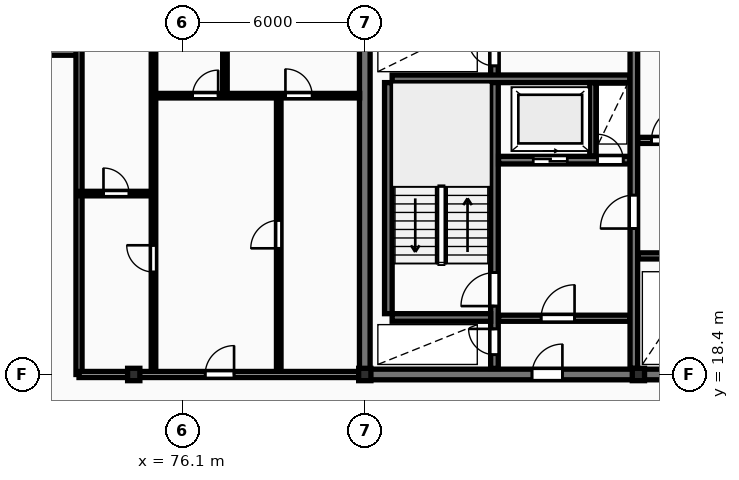
"""IFC4 building model, lengths in metres.
Left out: names, types, materials, properties, quantities, classifications, styles, units other than length and angle.
Written with IfcOpenShell. Run it as: python <this file> out.ifc"""

import sys

from ifc_helpers import new_model, si_unit, direction, frame, frame_2d, origin, origin_2d, place, context, subcontext, project, spatial, rectangle, i_section, extrude, element, fill, save


model = new_model("IFC4")
c1 = context("Model", 3, precision=1e-05, world=origin(), true_north=direction((0.0, 1.0)))
c2 = subcontext(c1, "Body", "Model", "MODEL_VIEW")
j1 = project(units=[si_unit("LENGTHUNIT", "METRE"), si_unit("PLANEANGLEUNIT", "RADIAN")], contexts=[c1])
p1 = place(None, origin())
s1 = spatial("IfcSite", under=j1, at=p1, CompositionType="ELEMENT")
p2 = place(p1, origin())
s2 = spatial("IfcBuilding", under=s1, at=p2, CompositionType="ELEMENT")
p3 = place(p2, frame((0.0, 0.0, 142.9)))
s3 = spatial("IfcBuildingStorey", under=s2, at=p3, CompositionType="ELEMENT", Elevation=142.9)
for number, where, z_axis, x_axis in (
    (1, (74.5, 18.4, 0.0), (0.0, 0.0, 1.0), (1.0, 0.0, 0.0)),
    (2, (82.1, 18.4, 0.0), (0.0, 0.0, 1.0), (1.0, 0.0, 0.0)),
    (3, (91.1, 18.4, 0.0), (0.0, 0.0, 1.0), (1.0, 0.0, 0.0)),
):
    element("IfcColumn", number, at=place(p3, frame(where, z_axis=z_axis, x_axis=x_axis)), inside=s3, PredefinedType="COLUMN", context=c2, shape_type="SweptSolid", body=[
        extrude(i_section(OverallWidth=0.403, OverallDepth=0.406, WebThickness=0.027, FlangeThickness=0.043, FilletRadius=0.015, at=origin_2d()), origin(), (0.0, 0.0, 1.0), 3.6),
    ])
p4 = place(p3, frame((72.7, 29.05, 0.0), z_axis=(0.0, 0.0, 1.0), x_axis=(-1.0, 0.0, 0.0)))
e4 = element("IfcWall", 4, at=p4, inside=s3, PredefinedType="STANDARD", context=c2, shape_type="SweptSolid", body=[
    extrude(rectangle(XDim=3.6, YDim=0.3, at=frame_2d((1.8, 0.0))), origin(), (0.0, 0.0, 1.0), 3.31),
])
p5 = place(p3, frame((82.1, 18.575, 0.0), z_axis=(0.0, 0.0, 1.0), x_axis=(0.0, 1.0, 0.0)))
e5 = element("IfcWall", 5, at=p5, inside=s3, PredefinedType="SHEAR", context=c2, shape_type="SweptSolid", body=[
    extrude(rectangle(XDim=11.65, YDim=0.35, at=frame_2d((5.825, 0.0))), origin(), (0.0, 0.0, 1.0), 3.6),
])
p6 = place(p3, frame((81.925, 18.4, 0.0), z_axis=(0.0, 0.0, 1.0), x_axis=(1.0, 0.0, 0.0)))
e6 = element("IfcWall", 6, at=p6, inside=s3, PredefinedType="SHEAR", context=c2, shape_type="SweptSolid", body=[
    extrude(rectangle(XDim=36.265, YDim=0.35, at=frame_2d((18.132, 0.0))), origin(), (0.0, 0.0, 1.0), 3.6),
])
p7 = place(p6, frame((5.675, 0.0, 0.0)))
e7 = element("IfcOpeningElement", 7, at=p7, cuts=e6, PredefinedType="OPENING", context=c2, shape_type="SweptSolid", body=[
    extrude(rectangle(XDim=1.0, YDim=2.15, at=frame_2d((0.5, 1.075))), frame((0.0, 0.185, 0.0), z_axis=(0.0, -1.0, 0.0), x_axis=(1.0, 0.0, 0.0)), (0.0, 0.0, 1.0), 0.37),
])
p8 = place(p6, frame((21.925, 0.0, 0.0)))
e8 = element("IfcOpeningElement", 8, at=p8, cuts=e6, PredefinedType="OPENING", context=c2, shape_type="SweptSolid", body=[
    extrude(rectangle(XDim=1.5, YDim=2.2, at=frame_2d((0.75, 1.1))), frame((0.0, 0.185, 0.0), z_axis=(0.0, -1.0, 0.0), x_axis=(1.0, 0.0, 0.0)), (0.0, 0.0, 1.0), 0.37),
])
p9 = place(p6, frame((29.875, 0.0, 0.0)))
e9 = element("IfcOpeningElement", 9, at=p9, cuts=e6, PredefinedType="OPENING", context=c2, shape_type="SweptSolid", body=[
    extrude(rectangle(XDim=1.0, YDim=2.15, at=frame_2d((0.5, 1.075))), frame((0.0, 0.185, 0.0), z_axis=(0.0, -1.0, 0.0), x_axis=(1.0, 0.0, 0.0)), (0.0, 0.0, 1.0), 0.37),
])
p10 = place(p3, frame((82.875, 20.4, 0.0), z_axis=(0.0, 0.0, 1.0), x_axis=(0.0, 1.0, 0.0)))
e10 = element("IfcWall", 10, at=p10, inside=s3, PredefinedType="SHEAR", context=c2, shape_type="SweptSolid", body=[
    extrude(rectangle(XDim=7.6, YDim=0.25, at=frame_2d((3.8, 0.0))), origin(), (0.0, 0.0, 1.0), 3.6),
])
p11 = place(p3, frame((86.365, 18.6, 0.0), z_axis=(0.0, 0.0, 1.0), x_axis=(0.0, 1.0, 0.0)))
e11 = element("IfcWall", 11, at=p11, inside=s3, PredefinedType="SHEAR", context=c2, shape_type="SweptSolid", body=[
    extrude(rectangle(XDim=11.6, YDim=0.25, at=frame_2d((5.8, 0.0))), origin(), (0.0, 0.0, 1.0), 3.6),
])
p12 = place(p11, frame((0.45, 0.0, 0.0)))
e12 = element("IfcOpeningElement", 12, at=p12, cuts=e11, PredefinedType="OPENING", context=c2, shape_type="SweptSolid", body=[
    extrude(rectangle(XDim=0.85, YDim=2.05, at=frame_2d((0.425, 1.025))), frame((0.0, 0.135, 0.0), z_axis=(0.0, -1.0, 0.0), x_axis=(1.0, 0.0, 0.0)), (0.0, 0.0, 1.0), 0.27),
])
p13 = place(p11, frame((2.05, 0.0, 0.0)))
e13 = element("IfcOpeningElement", 13, at=p13, cuts=e11, PredefinedType="OPENING", context=c2, shape_type="SweptSolid", body=[
    extrude(rectangle(XDim=1.1, YDim=2.1, at=frame_2d((0.55, 1.05))), frame((0.0, 0.135, 0.0), z_axis=(0.0, -1.0, 0.0), x_axis=(1.0, 0.0, 0.0)), (0.0, 0.0, 1.0), 0.27),
])
p14 = place(p11, frame((9.95, 0.0, 0.0)))
e14 = element("IfcOpeningElement", 14, at=p14, cuts=e11, PredefinedType="OPENING", context=c2, shape_type="SweptSolid", body=[
    extrude(rectangle(XDim=0.85, YDim=2.05, at=frame_2d((0.425, 1.025))), frame((0.0, 0.135, 0.0), z_axis=(0.0, -1.0, 0.0), x_axis=(1.0, 0.0, 0.0)), (0.0, 0.0, 1.0), 0.27),
])
p15 = place(p3, frame((83.0, 20.275, 0.0), z_axis=(0.0, 0.0, 1.0), x_axis=(1.0, 0.0, 0.0)))
e15 = element("IfcWall", 15, at=p15, inside=s3, PredefinedType="SHEAR", context=c2, shape_type="SweptSolid", body=[
    extrude(rectangle(XDim=3.24, YDim=0.25, at=frame_2d((1.62, 0.0))), origin(), (0.0, 0.0, 1.0), 3.6),
])
p16 = place(p3, frame((83.0, 28.125, 0.0), z_axis=(0.0, 0.0, 1.0), x_axis=(1.0, 0.0, 0.0)))
e16 = element("IfcWall", 16, at=p16, inside=s3, PredefinedType="SHEAR", context=c2, shape_type="SweptSolid", body=[
    extrude(rectangle(XDim=7.82, YDim=0.25, at=frame_2d((3.91, 0.0))), origin(), (0.0, 0.0, 1.0), 3.6),
])
p17 = place(p3, frame((86.5, 25.45, 0.0), z_axis=(0.0, 0.0, 1.0), x_axis=(1.0, 0.0, 0.0)))
e17 = element("IfcWall", 17, at=p17, inside=s3, PredefinedType="SHEAR", context=c2, shape_type="SweptSolid", body=[
    extrude(rectangle(XDim=4.32, YDim=0.25, at=frame_2d((2.16, 0.0))), origin(), (0.0, 0.0, 1.0), 3.6),
])
p18 = place(p17, frame((1.14, 0.0, 0.0)))
e18 = element("IfcOpeningElement", 18, at=p18, cuts=e17, PredefinedType="OPENING", context=c2, shape_type="SweptSolid", body=[
    extrude(rectangle(XDim=1.12, YDim=2.12, at=frame_2d((0.56, 1.06))), frame((0.0, 0.135, 0.0), z_axis=(0.0, -1.0, 0.0), x_axis=(1.0, 0.0, 0.0)), (0.0, 0.0, 1.0), 0.27),
])
p19 = place(p17, frame((3.25, 0.0, 0.0)))
e19 = element("IfcOpeningElement", 19, at=p19, cuts=e17, PredefinedType="OPENING", context=c2, shape_type="SweptSolid", body=[
    extrude(rectangle(XDim=0.85, YDim=2.05, at=frame_2d((0.425, 1.025))), frame((0.0, 0.135, 0.0), z_axis=(0.0, -1.0, 0.0), x_axis=(1.0, 0.0, 0.0)), (0.0, 0.0, 1.0), 0.27),
])
p20 = place(p3, frame((89.6, 25.58, 0.0), z_axis=(0.0, 0.0, 1.0), x_axis=(0.0, 1.0, 0.0)))
e20 = element("IfcWall", 20, at=p20, inside=s3, PredefinedType="PARTITIONING", context=c2, shape_type="SweptSolid", body=[
    extrude(rectangle(XDim=2.42, YDim=0.2, at=frame_2d((1.21, 0.0))), origin(), (0.0, 0.0, 1.0), 3.31),
])
p21 = place(p3, frame((86.5, 20.25, 0.0), z_axis=(0.0, 0.0, 1.0), x_axis=(1.0, 0.0, 0.0)))
e21 = element("IfcWall", 21, at=p21, inside=s3, PredefinedType="PARTITIONING", context=c2, shape_type="SweptSolid", body=[
    extrude(rectangle(XDim=4.32, YDim=0.2, at=frame_2d((2.16, 0.0))), origin(), (0.0, 0.0, 1.0), 3.31),
])
p22 = place(p21, frame((1.4, 0.0, 0.0)))
e22 = element("IfcOpeningElement", 22, at=p22, cuts=e21, PredefinedType="OPENING", context=c2, shape_type="SweptSolid", body=[
    extrude(rectangle(XDim=1.1, YDim=2.1, at=frame_2d((0.55, 1.05))), frame((0.0, 0.11, 0.0), z_axis=(0.0, -1.0, 0.0), x_axis=(1.0, 0.0, 0.0)), (0.0, 0.0, 1.0), 0.22),
])
p23 = place(p3, frame((90.95, 18.6, 0.0), z_axis=(0.0, 0.0, 1.0), x_axis=(0.0, 1.0, 0.0)))
e23 = element("IfcWall", 23, at=p23, inside=s3, PredefinedType="SHEAR", context=c2, shape_type="SweptSolid", body=[
    extrude(rectangle(XDim=11.6, YDim=0.25, at=frame_2d((5.8, 0.0))), origin(), (0.0, 0.0, 1.0), 3.6),
])
p24 = place(p23, frame((4.6, 0.0, 0.0)))
e24 = element("IfcOpeningElement", 24, at=p24, cuts=e23, PredefinedType="OPENING", context=c2, shape_type="SweptSolid", body=[
    extrude(rectangle(XDim=1.1, YDim=2.1, at=frame_2d((0.55, 1.05))), frame((0.0, 0.135, 0.0), z_axis=(0.0, -1.0, 0.0), x_axis=(1.0, 0.0, 0.0)), (0.0, 0.0, 1.0), 0.27),
])
p25 = place(p3, frame((91.08, 26.1, 0.0), z_axis=(0.0, 0.0, 1.0), x_axis=(1.0, 0.0, 0.0)))
e25 = element("IfcWall", 25, at=p25, inside=s3, PredefinedType="PARTITIONING", context=c2, shape_type="SweptSolid", body=[
    extrude(rectangle(XDim=8.34, YDim=0.2, at=frame_2d((4.17, 0.0))), origin(), (0.0, 0.0, 1.0), 3.31),
])
p26 = place(p25, frame((0.45, 0.0, 0.0)))
e26 = element("IfcOpeningElement", 26, at=p26, cuts=e25, PredefinedType="OPENING", context=c2, shape_type="SweptSolid", body=[
    extrude(rectangle(XDim=1.1, YDim=2.1, at=frame_2d((0.55, 1.05))), frame((0.0, 0.11, 0.0), z_axis=(0.0, -1.0, 0.0), x_axis=(1.0, 0.0, 0.0)), (0.0, 0.0, 1.0), 0.22),
])
p27 = place(p25, frame((4.6, 0.0, 0.0)))
e27 = element("IfcOpeningElement", 27, at=p27, cuts=e25, PredefinedType="OPENING", context=c2, shape_type="SweptSolid", body=[
    extrude(rectangle(XDim=0.92, YDim=2.08, at=frame_2d((0.46, 1.04))), frame((0.0, 0.11, 0.0), z_axis=(0.0, -1.0, 0.0), x_axis=(1.0, 0.0, 0.0)), (0.0, 0.0, 1.0), 0.22),
])
p28 = place(p3, frame((91.08, 22.3, 0.0), z_axis=(0.0, 0.0, 1.0), x_axis=(1.0, 0.0, 0.0)))
e28 = element("IfcWall", 28, at=p28, inside=s3, PredefinedType="PARTITIONING", context=c2, shape_type="SweptSolid", body=[
    extrude(rectangle(XDim=19.14, YDim=0.2, at=frame_2d((9.57, 0.0))), origin(), (0.0, 0.0, 1.0), 3.31),
])
p29 = place(p28, frame((1.15, 0.0, 0.0)))
e29 = element("IfcOpeningElement", 29, at=p29, cuts=e28, PredefinedType="OPENING", context=c2, shape_type="SweptSolid", body=[
    extrude(rectangle(XDim=0.85, YDim=2.05, at=frame_2d((0.425, 1.025))), frame((0.0, 0.11, 0.0), z_axis=(0.0, -1.0, 0.0), x_axis=(1.0, 0.0, 0.0)), (0.0, 0.0, 1.0), 0.22),
])
p30 = place(p28, frame((3.2, 0.0, 0.0)))
e30 = element("IfcOpeningElement", 30, at=p30, cuts=e28, PredefinedType="OPENING", context=c2, shape_type="SweptSolid", body=[
    extrude(rectangle(XDim=0.85, YDim=2.05, at=frame_2d((0.425, 1.025))), frame((0.0, 0.11, 0.0), z_axis=(0.0, -1.0, 0.0), x_axis=(1.0, 0.0, 0.0)), (0.0, 0.0, 1.0), 0.22),
])
p31 = place(p28, frame((12.72, 0.0, 0.0)))
e31 = element("IfcOpeningElement", 31, at=p31, cuts=e28, PredefinedType="OPENING", context=c2, shape_type="SweptSolid", body=[
    extrude(rectangle(XDim=1.5, YDim=2.2, at=frame_2d((0.75, 1.1))), frame((0.0, 0.11, 0.0), z_axis=(0.0, -1.0, 0.0), x_axis=(1.0, 0.0, 0.0)), (0.0, 0.0, 1.0), 0.22),
])
p32 = place(p28, frame((6.42, 0.0, 0.0)))
e32 = element("IfcOpeningElement", 32, at=p32, cuts=e28, PredefinedType="OPENING", context=c2, shape_type="SweptSolid", body=[
    extrude(rectangle(XDim=0.92, YDim=2.08, at=frame_2d((0.46, 1.04))), frame((0.0, 0.11, 0.0), z_axis=(0.0, -1.0, 0.0), x_axis=(1.0, 0.0, 0.0)), (0.0, 0.0, 1.0), 0.22),
])
p33 = place(p28, frame((15.87, 0.0, 0.0)))
e33 = element("IfcOpeningElement", 33, at=p33, cuts=e28, PredefinedType="OPENING", context=c2, shape_type="SweptSolid", body=[
    extrude(rectangle(XDim=0.92, YDim=2.08, at=frame_2d((0.46, 1.04))), frame((0.0, 0.11, 0.0), z_axis=(0.0, -1.0, 0.0), x_axis=(1.0, 0.0, 0.0)), (0.0, 0.0, 1.0), 0.22),
])
p34 = place(p3, frame((72.7, 18.4, 0.0), z_axis=(0.0, 0.0, 1.0), x_axis=(0.0, 1.0, 0.0)))
e34 = element("IfcWall", 34, at=p34, inside=s3, PredefinedType="PARTITIONING", context=c2, shape_type="SweptSolid", body=[
    extrude(rectangle(XDim=14.1, YDim=0.2, at=frame_2d((7.05, 0.0))), origin(), (0.0, 0.0, 1.0), 3.31),
])
p35 = place(p3, frame((72.7, 24.35, 0.0), z_axis=(0.0, 0.0, 1.0), x_axis=(1.0, 0.0, 0.0)))
e35 = element("IfcWall", 35, at=p35, inside=s3, PredefinedType="PARTITIONING", context=c2, shape_type="SweptSolid", body=[
    extrude(rectangle(XDim=2.45, YDim=0.15, at=frame_2d((1.225, 0.0))), origin(), (0.0, 0.0, 1.0), 3.31),
])
p36 = place(p35, frame((0.805, 0.0, 0.0)))
e36 = element("IfcOpeningElement", 36, at=p36, cuts=e35, PredefinedType="OPENING", context=c2, shape_type="SweptSolid", body=[
    extrude(rectangle(XDim=0.84, YDim=2.04, at=frame_2d((0.42, 1.02))), frame((0.0, 0.085, 0.0), z_axis=(0.0, -1.0, 0.0), x_axis=(1.0, 0.0, 0.0)), (0.0, 0.0, 1.0), 0.17),
])
p37 = place(p3, frame((75.15, 18.45, 0.0), z_axis=(0.0, 0.0, 1.0), x_axis=(0.0, 1.0, 0.0)))
e37 = element("IfcWall", 37, at=p37, inside=s3, PredefinedType="PARTITIONING", context=c2, shape_type="SweptSolid", body=[
    extrude(rectangle(XDim=14.05, YDim=0.15, at=frame_2d((7.025, 0.0))), origin(), (0.0, 0.0, 1.0), 3.31),
])
p38 = place(p37, frame((3.32, 0.0, 0.0)))
e38 = element("IfcOpeningElement", 38, at=p38, cuts=e37, PredefinedType="OPENING", context=c2, shape_type="SweptSolid", body=[
    extrude(rectangle(XDim=0.88, YDim=2.06, at=frame_2d((0.44, 1.03))), frame((0.0, 0.085, 0.0), z_axis=(0.0, -1.0, 0.0), x_axis=(1.0, 0.0, 0.0)), (0.0, 0.0, 1.0), 0.17),
])
p39 = place(p3, frame((79.27, 18.45, 0.0), z_axis=(0.0, 0.0, 1.0), x_axis=(0.0, 1.0, 0.0)))
e39 = element("IfcWall", 39, at=p39, inside=s3, PredefinedType="PARTITIONING", context=c2, shape_type="SweptSolid", body=[
    extrude(rectangle(XDim=9.12, YDim=0.15, at=frame_2d((4.56, 0.0))), origin(), (0.0, 0.0, 1.0), 3.31),
])
p40 = place(p39, frame((4.1, 0.0, 0.0)))
e40 = element("IfcOpeningElement", 40, at=p40, cuts=e39, PredefinedType="OPENING", context=c2, shape_type="SweptSolid", body=[
    extrude(rectangle(XDim=0.92, YDim=2.08, at=frame_2d((0.46, 1.04))), frame((0.0, 0.085, 0.0), z_axis=(0.0, -1.0, 0.0), x_axis=(1.0, 0.0, 0.0)), (0.0, 0.0, 1.0), 0.17),
])
p41 = place(p3, frame((77.5, 27.57, 0.0), z_axis=(0.0, 0.0, 1.0), x_axis=(0.0, 1.0, 0.0)))
e41 = element("IfcWall", 41, at=p41, inside=s3, PredefinedType="PARTITIONING", context=c2, shape_type="SweptSolid", body=[
    extrude(rectangle(XDim=4.93, YDim=0.15, at=frame_2d((2.465, 0.0))), origin(), (0.0, 0.0, 1.0), 3.31),
])
p42 = place(p3, frame((75.17, 27.57, 0.0), z_axis=(0.0, 0.0, 1.0), x_axis=(1.0, 0.0, 0.0)))
e42 = element("IfcWall", 42, at=p42, inside=s3, PredefinedType="PARTITIONING", context=c2, shape_type="SweptSolid", body=[
    extrude(rectangle(XDim=6.76, YDim=0.15, at=frame_2d((3.38, 0.0))), origin(), (0.0, 0.0, 1.0), 3.31),
])
p43 = place(p42, frame((1.266, 0.0, 0.0)))
e43 = element("IfcOpeningElement", 43, at=p43, cuts=e42, PredefinedType="OPENING", context=c2, shape_type="SweptSolid", body=[
    extrude(rectangle(XDim=0.84, YDim=2.04, at=frame_2d((0.42, 1.02))), frame((0.0, 0.085, 0.0), z_axis=(0.0, -1.0, 0.0), x_axis=(1.0, 0.0, 0.0)), (0.0, 0.0, 1.0), 0.17),
])
p44 = place(p42, frame((4.32, 0.0, 0.0)))
e44 = element("IfcOpeningElement", 44, at=p44, cuts=e42, PredefinedType="OPENING", context=c2, shape_type="SweptSolid", body=[
    extrude(rectangle(XDim=0.88, YDim=2.06, at=frame_2d((0.44, 1.03))), frame((0.0, 0.085, 0.0), z_axis=(0.0, -1.0, 0.0), x_axis=(1.0, 0.0, 0.0)), (0.0, 0.0, 1.0), 0.17),
])
p45 = place(p3, frame((72.7, 18.4, 0.0), z_axis=(0.0, 0.0, 1.0), x_axis=(1.0, 0.0, 0.0)))
e45 = element("IfcWall", 45, at=p45, inside=s3, PredefinedType="PARTITIONING", context=c2, shape_type="SweptSolid", body=[
    extrude(rectangle(XDim=9.25, YDim=0.2, at=frame_2d((4.625, 0.0))), origin(), (0.0, 0.0, 1.0), 2.698),
])
p46 = place(p45, frame((4.15, 0.0, 0.0)))
e46 = element("IfcOpeningElement", 46, at=p46, cuts=e45, PredefinedType="OPENING", context=c2, shape_type="SweptSolid", body=[
    extrude(rectangle(XDim=0.95, YDim=2.15, at=frame_2d((0.475, 1.075))), frame((0.0, 0.11, 0.0), z_axis=(0.0, -1.0, 0.0), x_axis=(1.0, 0.0, 0.0)), (0.0, 0.0, 1.0), 0.22),
])
p47 = place(p7, origin())
e47 = element("IfcDoor", 47, at=p47, inside=s3, OperationType="SINGLE_SWING_RIGHT", PredefinedType="DOOR", context=c2, shape_type="SweptSolid", body=[
    extrude(rectangle(XDim=1.0, YDim=2.15, at=frame_2d((0.5, 1.075))), frame((0.0, 0.025, 0.0), z_axis=(0.0, -1.0, 0.0), x_axis=(1.0, 0.0, 0.0)), (0.0, 0.0, 1.0), 0.05),
])
fill(e7, e47)
p48 = place(p12, origin())
e48 = element("IfcDoor", 48, at=p48, inside=s3, OperationType="SINGLE_SWING_RIGHT", PredefinedType="DOOR", context=c2, shape_type="SweptSolid", body=[
    extrude(rectangle(XDim=0.85, YDim=2.05, at=frame_2d((0.425, 1.025))), frame((0.0, 0.025, 0.0), z_axis=(0.0, -1.0, 0.0), x_axis=(1.0, 0.0, 0.0)), (0.0, 0.0, 1.0), 0.05),
])
fill(e12, e48)
p49 = place(p13, origin())
e49 = element("IfcDoor", 49, at=p49, inside=s3, OperationType="SINGLE_SWING_LEFT", PredefinedType="DOOR", context=c2, shape_type="SweptSolid", body=[
    extrude(rectangle(XDim=1.1, YDim=2.1, at=frame_2d((0.55, 1.05))), frame((0.0, 0.025, 0.0), z_axis=(0.0, -1.0, 0.0), x_axis=(1.0, 0.0, 0.0)), (0.0, 0.0, 1.0), 0.05),
])
fill(e13, e49)
p50 = place(p14, origin())
e50 = element("IfcDoor", 50, at=p50, inside=s3, OperationType="SINGLE_SWING_RIGHT", PredefinedType="DOOR", context=c2, shape_type="SweptSolid", body=[
    extrude(rectangle(XDim=0.85, YDim=2.05, at=frame_2d((0.425, 1.025))), frame((0.0, 0.025, 0.0), z_axis=(0.0, -1.0, 0.0), x_axis=(1.0, 0.0, 0.0)), (0.0, 0.0, 1.0), 0.05),
])
fill(e14, e50)
p51 = place(p18, origin())
e51 = element("IfcDoor", 51, at=p51, inside=s3, OperationType="SLIDING_TO_RIGHT", PredefinedType="DOOR", context=c2, shape_type="SweptSolid", body=[
    extrude(rectangle(XDim=1.12, YDim=2.12, at=frame_2d((0.56, 1.06))), frame((0.0, 0.025, 0.0), z_axis=(0.0, -1.0, 0.0), x_axis=(1.0, 0.0, 0.0)), (0.0, 0.0, 1.0), 0.05),
])
fill(e18, e51)
p52 = place(p19, origin())
e52 = element("IfcDoor", 52, at=p52, inside=s3, OperationType="SINGLE_SWING_LEFT", PredefinedType="DOOR", context=c2, shape_type="SweptSolid", body=[
    extrude(rectangle(XDim=0.85, YDim=2.05, at=frame_2d((0.425, 1.025))), frame((0.0, 0.025, 0.0), z_axis=(0.0, -1.0, 0.0), x_axis=(1.0, 0.0, 0.0)), (0.0, 0.0, 1.0), 0.05),
])
fill(e19, e52)
p53 = place(p22, origin())
e53 = element("IfcDoor", 53, at=p53, inside=s3, OperationType="SINGLE_SWING_RIGHT", PredefinedType="DOOR", context=c2, shape_type="SweptSolid", body=[
    extrude(rectangle(XDim=1.1, YDim=2.1, at=frame_2d((0.55, 1.05))), frame((0.0, 0.025, 0.0), z_axis=(0.0, -1.0, 0.0), x_axis=(1.0, 0.0, 0.0)), (0.0, 0.0, 1.0), 0.05),
])
fill(e22, e53)
p54 = place(p24, origin())
e54 = element("IfcDoor", 54, at=p54, inside=s3, OperationType="SINGLE_SWING_LEFT", PredefinedType="DOOR", context=c2, shape_type="SweptSolid", body=[
    extrude(rectangle(XDim=1.1, YDim=2.1, at=frame_2d((0.55, 1.05))), frame((0.0, 0.025, 0.0), z_axis=(0.0, -1.0, 0.0), x_axis=(1.0, 0.0, 0.0)), (0.0, 0.0, 1.0), 0.05),
])
fill(e24, e54)
p55 = place(p26, origin())
e55 = element("IfcDoor", 55, at=p55, inside=s3, OperationType="SINGLE_SWING_RIGHT", PredefinedType="DOOR", context=c2, shape_type="SweptSolid", body=[
    extrude(rectangle(XDim=1.1, YDim=2.1, at=frame_2d((0.55, 1.05))), frame((0.0, 0.025, 0.0), z_axis=(0.0, -1.0, 0.0), x_axis=(1.0, 0.0, 0.0)), (0.0, 0.0, 1.0), 0.05),
])
fill(e26, e55)
p56 = place(p36, origin())
e56 = element("IfcDoor", 56, at=p56, inside=s3, OperationType="SINGLE_SWING_LEFT", PredefinedType="DOOR", context=c2, shape_type="SweptSolid", body=[
    extrude(rectangle(XDim=0.84, YDim=2.04, at=frame_2d((0.42, 1.02))), frame((0.0, 0.025, 0.0), z_axis=(0.0, -1.0, 0.0), x_axis=(1.0, 0.0, 0.0)), (0.0, 0.0, 1.0), 0.05),
])
fill(e36, e56)
p57 = place(p38, origin())
e57 = element("IfcDoor", 57, at=p57, inside=s3, OperationType="SINGLE_SWING_RIGHT", PredefinedType="DOOR", context=c2, shape_type="SweptSolid", body=[
    extrude(rectangle(XDim=0.88, YDim=2.06, at=frame_2d((0.44, 1.03))), frame((0.0, 0.025, 0.0), z_axis=(0.0, -1.0, 0.0), x_axis=(1.0, 0.0, 0.0)), (0.0, 0.0, 1.0), 0.05),
])
fill(e38, e57)
p58 = place(p40, origin())
e58 = element("IfcDoor", 58, at=p58, inside=s3, OperationType="SINGLE_SWING_LEFT", PredefinedType="DOOR", context=c2, shape_type="SweptSolid", body=[
    extrude(rectangle(XDim=0.92, YDim=2.08, at=frame_2d((0.46, 1.04))), frame((0.0, 0.025, 0.0), z_axis=(0.0, -1.0, 0.0), x_axis=(1.0, 0.0, 0.0)), (0.0, 0.0, 1.0), 0.05),
])
fill(e40, e58)
p59 = place(p43, origin())
e59 = element("IfcDoor", 59, at=p59, inside=s3, OperationType="SINGLE_SWING_RIGHT", PredefinedType="DOOR", context=c2, shape_type="SweptSolid", body=[
    extrude(rectangle(XDim=0.84, YDim=2.04, at=frame_2d((0.42, 1.02))), frame((0.0, 0.025, 0.0), z_axis=(0.0, -1.0, 0.0), x_axis=(1.0, 0.0, 0.0)), (0.0, 0.0, 1.0), 0.05),
])
fill(e43, e59)
p60 = place(p44, origin())
e60 = element("IfcDoor", 60, at=p60, inside=s3, OperationType="SINGLE_SWING_LEFT", PredefinedType="DOOR", context=c2, shape_type="SweptSolid", body=[
    extrude(rectangle(XDim=0.88, YDim=2.06, at=frame_2d((0.44, 1.03))), frame((0.0, 0.025, 0.0), z_axis=(0.0, -1.0, 0.0), x_axis=(1.0, 0.0, 0.0)), (0.0, 0.0, 1.0), 0.05),
])
fill(e44, e60)
p61 = place(p46, origin())
e61 = element("IfcDoor", 61, at=p61, inside=s3, OperationType="SINGLE_SWING_RIGHT", PredefinedType="DOOR", context=c2, shape_type="SweptSolid", body=[
    extrude(rectangle(XDim=0.95, YDim=2.15, at=frame_2d((0.475, 1.075))), frame((0.0, 0.025, 0.0), z_axis=(0.0, -1.0, 0.0), x_axis=(1.0, 0.0, 0.0)), (0.0, 0.0, 1.0), 0.05),
])
fill(e46, e61)
save(model, sys.argv[1])
